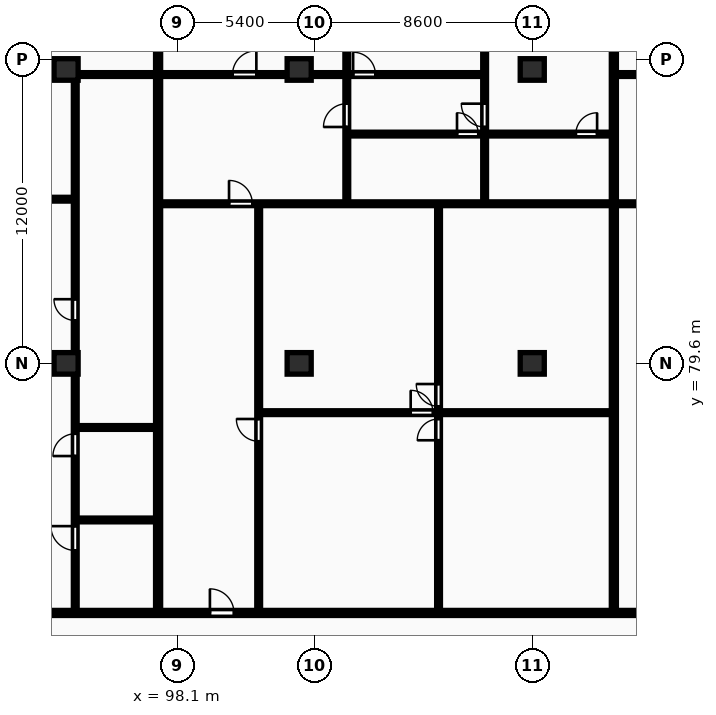
"""IFC4 building model, lengths in metres.
Left out: names, types, materials, properties, quantities, classifications, styles, units other than length and angle.
Written with IfcOpenShell. Run it as: python <this file> out.ifc"""

import sys

from ifc_helpers import new_model, si_unit, direction, frame, frame_2d, origin, origin_2d, place, context, subcontext, project, spatial, rectangle, extrude, element, fill, save


model = new_model("IFC4")
c1 = context("Model", 3, precision=1e-05, world=origin(), true_north=direction((0.0, 1.0)))
c2 = subcontext(c1, "Body", "Model", "MODEL_VIEW")
j1 = project(units=[si_unit("LENGTHUNIT", "METRE"), si_unit("PLANEANGLEUNIT", "RADIAN")], contexts=[c1])
p1 = place(None, origin())
s1 = spatial("IfcSite", under=j1, at=p1, CompositionType="ELEMENT")
p2 = place(p1, origin())
s2 = spatial("IfcBuilding", under=s1, at=p2, CompositionType="ELEMENT")
p3 = place(p2, frame((0.0, 0.0, 119.8)))
s3 = spatial("IfcBuildingStorey", under=s2, at=p3, CompositionType="ELEMENT", Elevation=119.8)
for number, where, z_axis, x_axis in (
    (1, (93.7, 79.6, 0.0), (0.0, 0.0, 1.0), (1.0, 0.0, 0.0)),
    (2, (93.7, 91.2, 0.0), (0.0, 0.0, 1.0), (1.0, 0.0, 0.0)),
    (3, (102.9, 79.6, 0.0), (0.0, 0.0, 1.0), (1.0, 0.0, 0.0)),
    (4, (102.9, 91.2, 0.0), (0.0, 0.0, 1.0), (1.0, 0.0, 0.0)),
    (5, (112.1, 79.6, 0.0), (0.0, 0.0, 1.0), (1.0, 0.0, 0.0)),
    (6, (112.1, 91.2, 0.0), (0.0, 0.0, 1.0), (1.0, 0.0, 0.0)),
):
    element("IfcColumn", number, at=place(p3, frame(where, z_axis=z_axis, x_axis=x_axis)), inside=s3, PredefinedType="COLUMN", context=c2, shape_type="SweptSolid", body=[
        extrude(rectangle(XDim=0.95, YDim=0.85, at=origin_2d()), origin(), (0.0, 0.0, 1.0), 3.25),
    ])
p4 = place(p3, frame((97.332, 69.83, 0.0), z_axis=(0.0, 0.0, 1.0), x_axis=(0.0, 1.0, 0.0)))
e7 = element("IfcWall", 7, at=p4, inside=s3, PredefinedType="PARTITIONING", context=c2, shape_type="SweptSolid", body=[
    extrude(rectangle(XDim=26.07, YDim=0.2, at=frame_2d((13.035, 0.0))), origin(), (0.0, 0.0, 1.0), 2.97),
])
p5 = place(p3, frame((77.591, 86.08, 0.0), z_axis=(0.0, 0.0, 1.0), x_axis=(1.0, 0.0, 0.0)))
e8 = element("IfcWall", 8, at=p5, inside=s3, PredefinedType="PARTITIONING", context=c2, shape_type="SweptSolid", body=[
    extrude(rectangle(XDim=16.431, YDim=0.15, at=frame_2d((8.215, 0.0))), origin(), (0.0, 0.0, 1.0), 2.97),
])
p6 = place(p5, frame((7.746, 0.0, 0.0)))
e9 = element("IfcOpeningElement", 9, at=p6, cuts=e8, PredefinedType="OPENING", context=c2, shape_type="SweptSolid", body=[
    extrude(rectangle(XDim=0.94, YDim=2.1, at=frame_2d((0.47, 1.05))), frame((0.0, 0.085, 0.0), z_axis=(0.0, -1.0, 0.0), x_axis=(1.0, 0.0, 0.0)), (0.0, 0.0, 1.0), 0.17),
])
for number, where, z_axis, x_axis in (
    (10, (94.122, 73.42, 0.0), (0.0, 0.0, 1.0), (1.0, 0.0, 0.0)),
    (11, (94.122, 77.07, 0.0), (0.0, 0.0, 1.0), (1.0, 0.0, 0.0)),
):
    element("IfcWall", number, at=place(p3, frame(where, z_axis=z_axis, x_axis=x_axis)), inside=s3, PredefinedType="PARTITIONING", context=c2, shape_type="SweptSolid", body=[
        extrude(rectangle(XDim=3.13, YDim=0.15, at=frame_2d((1.565, 0.0))), origin(), (0.0, 0.0, 1.0), 2.97),
    ])
p7 = place(p3, frame((94.062, 69.81, 0.0), z_axis=(0.0, 0.0, 1.0), x_axis=(0.0, 1.0, 0.0)))
e12 = element("IfcWall", 12, at=p7, inside=s3, PredefinedType="PARTITIONING", context=c2, shape_type="SweptSolid", body=[
    extrude(rectangle(XDim=21.13, YDim=0.15, at=frame_2d((10.565, 0.0))), origin(), (0.0, 0.0, 1.0), 2.97),
])
p8 = place(p7, frame((2.406, 0.0, 0.0)))
e13 = element("IfcOpeningElement", 13, at=p8, cuts=e12, PredefinedType="OPENING", context=c2, shape_type="SweptSolid", body=[
    extrude(rectangle(XDim=0.96, YDim=2.1, at=frame_2d((0.48, 1.05))), frame((0.0, 0.085, 0.0), z_axis=(0.0, -1.0, 0.0), x_axis=(1.0, 0.0, 0.0)), (0.0, 0.0, 1.0), 0.17),
])
p9 = place(p7, frame((6.133, 0.0, 0.0)))
e14 = element("IfcOpeningElement", 14, at=p9, cuts=e12, PredefinedType="OPENING", context=c2, shape_type="SweptSolid", body=[
    extrude(rectangle(XDim=0.88, YDim=2.06, at=frame_2d((0.44, 1.03))), frame((0.0, 0.085, 0.0), z_axis=(0.0, -1.0, 0.0), x_axis=(1.0, 0.0, 0.0)), (0.0, 0.0, 1.0), 0.17),
])
p10 = place(p7, frame((11.482, 0.0, 0.0)))
e15 = element("IfcOpeningElement", 15, at=p10, cuts=e12, PredefinedType="OPENING", context=c2, shape_type="SweptSolid", body=[
    extrude(rectangle(XDim=0.84, YDim=2.04, at=frame_2d((0.42, 1.02))), frame((0.0, 0.085, 0.0), z_axis=(0.0, -1.0, 0.0), x_axis=(1.0, 0.0, 0.0)), (0.0, 0.0, 1.0), 0.17),
])
p11 = place(p3, frame((77.591, 91.0, 0.0), z_axis=(0.0, 0.0, 1.0), x_axis=(1.0, 0.0, 0.0)))
e16 = element("IfcWall", 16, at=p11, inside=s3, PredefinedType="PARTITIONING", context=c2, shape_type="SweptSolid", body=[
    extrude(rectangle(XDim=19.661, YDim=0.15, at=frame_2d((9.831, 0.0))), origin(), (0.0, 0.0, 1.0), 2.663),
])
p12 = place(p11, frame((4.218, 0.0, 0.0)))
e17 = element("IfcOpeningElement", 17, at=p12, cuts=e16, PredefinedType="OPENING", context=c2, shape_type="SweptSolid", body=[
    extrude(rectangle(XDim=0.94, YDim=2.1, at=frame_2d((0.47, 1.05))), frame((0.0, 0.085, 0.0), z_axis=(0.0, -1.0, 0.0), x_axis=(1.0, 0.0, 0.0)), (0.0, 0.0, 1.0), 0.17),
])
p13 = place(p11, frame((9.361, 0.0, 0.0)))
e18 = element("IfcOpeningElement", 18, at=p13, cuts=e16, PredefinedType="OPENING", context=c2, shape_type="SweptSolid", body=[
    extrude(rectangle(XDim=0.94, YDim=2.1, at=frame_2d((0.47, 1.05))), frame((0.0, 0.085, 0.0), z_axis=(0.0, -1.0, 0.0), x_axis=(1.0, 0.0, 0.0)), (0.0, 0.0, 1.0), 0.17),
])
p14 = place(p3, frame((115.321, 69.83, 0.0), z_axis=(0.0, 0.0, 1.0), x_axis=(0.0, 1.0, 0.0)))
e19 = element("IfcWall", 19, at=p14, inside=s3, PredefinedType="PARTITIONING", context=c2, shape_type="SweptSolid", body=[
    extrude(rectangle(XDim=26.07, YDim=0.2, at=frame_2d((13.035, 0.0))), origin(), (0.0, 0.0, 1.0), 2.97),
])
p15 = place(p3, frame((108.401, 69.81, 0.0), z_axis=(0.0, 0.0, 1.0), x_axis=(0.0, 1.0, 0.0)))
e20 = element("IfcWall", 20, at=p15, inside=s3, PredefinedType="PARTITIONING", context=c2, shape_type="SweptSolid", body=[
    extrude(rectangle(XDim=16.05, YDim=0.15, at=frame_2d((8.025, 0.0))), origin(), (0.0, 0.0, 1.0), 2.97),
])
p16 = place(p15, frame((6.755, 0.0, 0.0)))
e21 = element("IfcOpeningElement", 21, at=p16, cuts=e20, PredefinedType="OPENING", context=c2, shape_type="SweptSolid", body=[
    extrude(rectangle(XDim=0.84, YDim=2.04, at=frame_2d((0.42, 1.02))), frame((0.0, 0.085, 0.0), z_axis=(0.0, -1.0, 0.0), x_axis=(1.0, 0.0, 0.0)), (0.0, 0.0, 1.0), 0.17),
])
p17 = place(p15, frame((8.095, 0.0, 0.0)))
e22 = element("IfcOpeningElement", 22, at=p17, cuts=e20, PredefinedType="OPENING", context=c2, shape_type="SweptSolid", body=[
    extrude(rectangle(XDim=0.88, YDim=2.06, at=frame_2d((0.44, 1.03))), frame((0.0, 0.085, 0.0), z_axis=(0.0, -1.0, 0.0), x_axis=(1.0, 0.0, 0.0)), (0.0, 0.0, 1.0), 0.17),
])
p18 = place(p3, frame((101.362, 77.655, 0.0), z_axis=(0.0, 0.0, 1.0), x_axis=(1.0, 0.0, 0.0)))
e23 = element("IfcWall", 23, at=p18, inside=s3, PredefinedType="PARTITIONING", context=c2, shape_type="SweptSolid", body=[
    extrude(rectangle(XDim=13.88, YDim=0.15, at=frame_2d((6.94, 0.0))), origin(), (0.0, 0.0, 1.0), 2.97),
])
p19 = place(p18, frame((5.94, 0.0, 0.0)))
e24 = element("IfcOpeningElement", 24, at=p19, cuts=e23, PredefinedType="OPENING", context=c2, shape_type="SweptSolid", body=[
    extrude(rectangle(XDim=0.88, YDim=2.06, at=frame_2d((0.44, 1.03))), frame((0.0, 0.085, 0.0), z_axis=(0.0, -1.0, 0.0), x_axis=(1.0, 0.0, 0.0)), (0.0, 0.0, 1.0), 0.17),
])
p20 = place(p3, frame((101.302, 69.81, 0.0), z_axis=(0.0, 0.0, 1.0), x_axis=(0.0, 1.0, 0.0)))
e25 = element("IfcWall", 25, at=p20, inside=s3, PredefinedType="PARTITIONING", context=c2, shape_type="SweptSolid", body=[
    extrude(rectangle(XDim=16.05, YDim=0.15, at=frame_2d((8.025, 0.0))), origin(), (0.0, 0.0, 1.0), 2.97),
])
p21 = place(p20, frame((6.715, 0.0, 0.0)))
e26 = element("IfcOpeningElement", 26, at=p21, cuts=e25, PredefinedType="OPENING", context=c2, shape_type="SweptSolid", body=[
    extrude(rectangle(XDim=0.88, YDim=2.06, at=frame_2d((0.44, 1.03))), frame((0.0, 0.085, 0.0), z_axis=(0.0, -1.0, 0.0), x_axis=(1.0, 0.0, 0.0)), (0.0, 0.0, 1.0), 0.17),
])
p22 = place(p3, frame((104.78, 85.94, 0.0), z_axis=(0.0, 0.0, 1.0), x_axis=(0.0, 1.0, 0.0)))
e27 = element("IfcWall", 27, at=p22, inside=s3, PredefinedType="PARTITIONING", context=c2, shape_type="SweptSolid", body=[
    extrude(rectangle(XDim=9.96, YDim=0.15, at=frame_2d((4.98, 0.0))), origin(), (0.0, 0.0, 1.0), 2.97),
])
p23 = place(p22, frame((2.99, 0.0, 0.0)))
e28 = element("IfcOpeningElement", 28, at=p23, cuts=e27, PredefinedType="OPENING", context=c2, shape_type="SweptSolid", body=[
    extrude(rectangle(XDim=0.92, YDim=2.08, at=frame_2d((0.46, 1.04))), frame((0.0, 0.085, 0.0), z_axis=(0.0, -1.0, 0.0), x_axis=(1.0, 0.0, 0.0)), (0.0, 0.0, 1.0), 0.17),
])
p24 = place(p3, frame((110.22, 85.94, 0.0), z_axis=(0.0, 0.0, 1.0), x_axis=(0.0, 1.0, 0.0)))
e29 = element("IfcWall", 29, at=p24, inside=s3, PredefinedType="PARTITIONING", context=c2, shape_type="SweptSolid", body=[
    extrude(rectangle(XDim=2.69, YDim=0.15, at=frame_2d((1.345, 0.0))), origin(), (0.0, 0.0, 1.0), 2.97),
])
p25 = place(p3, frame((110.22, 88.67, 0.0), z_axis=(0.0, 0.0, 1.0), x_axis=(0.0, 1.0, 0.0)))
e30 = element("IfcWall", 30, at=p25, inside=s3, PredefinedType="PARTITIONING", context=c2, shape_type="SweptSolid", body=[
    extrude(rectangle(XDim=7.23, YDim=0.15, at=frame_2d((3.615, 0.0))), origin(), (0.0, 0.0, 1.0), 2.97),
])
p26 = place(p25, frame((0.26, 0.0, 0.0)))
e31 = element("IfcOpeningElement", 31, at=p26, cuts=e30, PredefinedType="OPENING", context=c2, shape_type="SweptSolid", body=[
    extrude(rectangle(XDim=0.92, YDim=2.08, at=frame_2d((0.46, 1.04))), frame((0.0, 0.085, 0.0), z_axis=(0.0, -1.0, 0.0), x_axis=(1.0, 0.0, 0.0)), (0.0, 0.0, 1.0), 0.17),
])
p27 = place(p3, frame((104.82, 88.65, 0.0), z_axis=(0.0, 0.0, 1.0), x_axis=(1.0, 0.0, 0.0)))
e32 = element("IfcWall", 32, at=p27, inside=s3, PredefinedType="PARTITIONING", context=c2, shape_type="SweptSolid", body=[
    extrude(rectangle(XDim=10.421, YDim=0.15, at=frame_2d((5.21, 0.0))), origin(), (0.0, 0.0, 1.0), 2.97),
])
p28 = place(p27, frame((4.31, 0.0, 0.0)))
e33 = element("IfcOpeningElement", 33, at=p28, cuts=e32, PredefinedType="OPENING", context=c2, shape_type="SweptSolid", body=[
    extrude(rectangle(XDim=0.84, YDim=2.04, at=frame_2d((0.42, 1.02))), frame((0.0, 0.085, 0.0), z_axis=(0.0, -1.0, 0.0), x_axis=(1.0, 0.0, 0.0)), (0.0, 0.0, 1.0), 0.17),
])
p29 = place(p27, frame((9.0, 0.0, 0.0)))
e34 = element("IfcOpeningElement", 34, at=p29, cuts=e32, PredefinedType="OPENING", context=c2, shape_type="SweptSolid", body=[
    extrude(rectangle(XDim=0.84, YDim=2.04, at=frame_2d((0.42, 1.02))), frame((0.0, 0.085, 0.0), z_axis=(0.0, -1.0, 0.0), x_axis=(1.0, 0.0, 0.0)), (0.0, 0.0, 1.0), 0.17),
])
p30 = place(p3, frame((97.412, 85.9, 0.0), z_axis=(0.0, 0.0, 1.0), x_axis=(1.0, 0.0, 0.0)))
e35 = element("IfcWall", 35, at=p30, inside=s3, PredefinedType="PARTITIONING", context=c2, shape_type="SweptSolid", body=[
    extrude(rectangle(XDim=17.83, YDim=0.15, at=frame_2d((8.915, 0.0))), origin(), (0.0, 0.0, 1.0), 2.97),
])
p31 = place(p30, frame((2.72, 0.0, 0.0)))
e36 = element("IfcOpeningElement", 36, at=p31, cuts=e35, PredefinedType="OPENING", context=c2, shape_type="SweptSolid", body=[
    extrude(rectangle(XDim=0.92, YDim=2.08, at=frame_2d((0.46, 1.04))), frame((0.0, 0.085, 0.0), z_axis=(0.0, -1.0, 0.0), x_axis=(1.0, 0.0, 0.0)), (0.0, 0.0, 1.0), 0.17),
])
p32 = place(p3, frame((97.412, 91.0, 0.0), z_axis=(0.0, 0.0, 1.0), x_axis=(1.0, 0.0, 0.0)))
e37 = element("IfcWall", 37, at=p32, inside=s3, PredefinedType="PARTITIONING", context=c2, shape_type="SweptSolid", body=[
    extrude(rectangle(XDim=12.808, YDim=0.15, at=frame_2d((6.404, 0.0))), origin(), (0.0, 0.0, 1.0), 2.663),
])
p33 = place(p32, frame((2.858, 0.0, 0.0)))
e38 = element("IfcOpeningElement", 38, at=p33, cuts=e37, PredefinedType="OPENING", context=c2, shape_type="SweptSolid", body=[
    extrude(rectangle(XDim=0.94, YDim=2.1, at=frame_2d((0.47, 1.05))), frame((0.0, 0.085, 0.0), z_axis=(0.0, -1.0, 0.0), x_axis=(1.0, 0.0, 0.0)), (0.0, 0.0, 1.0), 0.17),
])
p34 = place(p32, frame((7.618, 0.0, 0.0)))
e39 = element("IfcOpeningElement", 39, at=p34, cuts=e37, PredefinedType="OPENING", context=c2, shape_type="SweptSolid", body=[
    extrude(rectangle(XDim=0.88, YDim=2.06, at=frame_2d((0.44, 1.03))), frame((0.0, 0.085, 0.0), z_axis=(0.0, -1.0, 0.0), x_axis=(1.0, 0.0, 0.0)), (0.0, 0.0, 1.0), 0.17),
])
p35 = place(p3, frame((115.401, 85.9, 0.0), z_axis=(0.0, 0.0, 1.0), x_axis=(1.0, 0.0, 0.0)))
e40 = element("IfcWall", 40, at=p35, inside=s3, PredefinedType="PARTITIONING", context=c2, shape_type="SweptSolid", body=[
    extrude(rectangle(XDim=15.119, YDim=0.15, at=frame_2d((7.56, 0.0))), origin(), (0.0, 0.0, 1.0), 2.97),
])
p36 = place(p35, frame((2.72, 0.0, 0.0)))
e41 = element("IfcOpeningElement", 41, at=p36, cuts=e40, PredefinedType="OPENING", context=c2, shape_type="SweptSolid", body=[
    extrude(rectangle(XDim=0.92, YDim=2.08, at=frame_2d((0.46, 1.04))), frame((0.0, 0.085, 0.0), z_axis=(0.0, -1.0, 0.0), x_axis=(1.0, 0.0, 0.0)), (0.0, 0.0, 1.0), 0.17),
])
p37 = place(p3, frame((115.401, 91.0, 0.0), z_axis=(0.0, 0.0, 1.0), x_axis=(1.0, 0.0, 0.0)))
e42 = element("IfcWall", 42, at=p37, inside=s3, PredefinedType="PARTITIONING", context=c2, shape_type="SweptSolid", body=[
    extrude(rectangle(XDim=10.869, YDim=0.15, at=frame_2d((5.435, 0.0))), origin(), (0.0, 0.0, 1.0), 2.663),
])
p38 = place(p37, frame((2.279, 0.0, 0.0)))
e43 = element("IfcOpeningElement", 43, at=p38, cuts=e42, PredefinedType="OPENING", context=c2, shape_type="SweptSolid", body=[
    extrude(rectangle(XDim=0.94, YDim=2.1, at=frame_2d((0.47, 1.05))), frame((0.0, 0.085, 0.0), z_axis=(0.0, -1.0, 0.0), x_axis=(1.0, 0.0, 0.0)), (0.0, 0.0, 1.0), 0.17),
])
p39 = place(p37, frame((7.029, 0.0, 0.0)))
e44 = element("IfcOpeningElement", 44, at=p39, cuts=e42, PredefinedType="OPENING", context=c2, shape_type="SweptSolid", body=[
    extrude(rectangle(XDim=0.88, YDim=2.06, at=frame_2d((0.44, 1.03))), frame((0.0, 0.085, 0.0), z_axis=(0.0, -1.0, 0.0), x_axis=(1.0, 0.0, 0.0)), (0.0, 0.0, 1.0), 0.17),
])
p40 = place(p3, frame((57.6, 69.75, 0.0), z_axis=(0.0, 0.0, 1.0), x_axis=(1.0, 0.0, 0.0)))
e45 = element("IfcWall", 45, at=p40, inside=s3, PredefinedType="PARTITIONING", context=c2, shape_type="SweptSolid", body=[
    extrude(rectangle(XDim=73.0, YDim=0.2, at=frame_2d((36.5, 0.0))), origin(), (0.0, 0.0, 1.0), 2.97),
])
p41 = place(p40, frame((7.364, 0.0, 0.0)))
e46 = element("IfcOpeningElement", 46, at=p41, cuts=e45, PredefinedType="OPENING", context=c2, shape_type="SweptSolid", body=[
    extrude(rectangle(XDim=1.22, YDim=2.18, at=frame_2d((0.61, 1.09))), frame((0.0, 0.11, 0.0), z_axis=(0.0, -1.0, 0.0), x_axis=(1.0, 0.0, 0.0)), (0.0, 0.0, 1.0), 0.22),
])
p42 = place(p40, frame((28.813, 0.0, 0.0)))
e47 = element("IfcOpeningElement", 47, at=p42, cuts=e45, PredefinedType="OPENING", context=c2, shape_type="SweptSolid", body=[
    extrude(rectangle(XDim=1.22, YDim=2.18, at=frame_2d((0.61, 1.09))), frame((0.0, 0.11, 0.0), z_axis=(0.0, -1.0, 0.0), x_axis=(1.0, 0.0, 0.0)), (0.0, 0.0, 1.0), 0.22),
])
p43 = place(p40, frame((41.777, 0.0, 0.0)))
e48 = element("IfcOpeningElement", 48, at=p43, cuts=e45, PredefinedType="OPENING", context=c2, shape_type="SweptSolid", body=[
    extrude(rectangle(XDim=0.95, YDim=2.15, at=frame_2d((0.475, 1.075))), frame((0.0, 0.11, 0.0), z_axis=(0.0, -1.0, 0.0), x_axis=(1.0, 0.0, 0.0)), (0.0, 0.0, 1.0), 0.22),
])
p44 = place(p40, frame((59.766, 0.0, 0.0)))
e49 = element("IfcOpeningElement", 49, at=p44, cuts=e45, PredefinedType="OPENING", context=c2, shape_type="SweptSolid", body=[
    extrude(rectangle(XDim=0.95, YDim=2.15, at=frame_2d((0.475, 1.075))), frame((0.0, 0.11, 0.0), z_axis=(0.0, -1.0, 0.0), x_axis=(1.0, 0.0, 0.0)), (0.0, 0.0, 1.0), 0.22),
])
p45 = place(p8, origin())
e50 = element("IfcDoor", 50, at=p45, inside=s3, OperationType="SINGLE_SWING_RIGHT", PredefinedType="DOOR", context=c2, shape_type="SweptSolid", body=[
    extrude(rectangle(XDim=0.96, YDim=2.1, at=frame_2d((0.48, 1.05))), frame((0.0, 0.025, 0.0), z_axis=(0.0, -1.0, 0.0), x_axis=(1.0, 0.0, 0.0)), (0.0, 0.0, 1.0), 0.05),
])
fill(e13, e50)
p46 = place(p9, origin())
e51 = element("IfcDoor", 51, at=p46, inside=s3, OperationType="SINGLE_SWING_LEFT", PredefinedType="DOOR", context=c2, shape_type="SweptSolid", body=[
    extrude(rectangle(XDim=0.88, YDim=2.06, at=frame_2d((0.44, 1.03))), frame((0.0, 0.025, 0.0), z_axis=(0.0, -1.0, 0.0), x_axis=(1.0, 0.0, 0.0)), (0.0, 0.0, 1.0), 0.05),
])
fill(e14, e51)
p47 = place(p10, origin())
e52 = element("IfcDoor", 52, at=p47, inside=s3, OperationType="SINGLE_SWING_RIGHT", PredefinedType="DOOR", context=c2, shape_type="SweptSolid", body=[
    extrude(rectangle(XDim=0.84, YDim=2.04, at=frame_2d((0.42, 1.02))), frame((0.0, 0.025, 0.0), z_axis=(0.0, -1.0, 0.0), x_axis=(1.0, 0.0, 0.0)), (0.0, 0.0, 1.0), 0.05),
])
fill(e15, e52)
p48 = place(p16, origin())
e53 = element("IfcDoor", 53, at=p48, inside=s3, OperationType="SINGLE_SWING_LEFT", PredefinedType="DOOR", context=c2, shape_type="SweptSolid", body=[
    extrude(rectangle(XDim=0.84, YDim=2.04, at=frame_2d((0.42, 1.02))), frame((0.0, 0.025, 0.0), z_axis=(0.0, -1.0, 0.0), x_axis=(1.0, 0.0, 0.0)), (0.0, 0.0, 1.0), 0.05),
])
fill(e21, e53)
p49 = place(p17, origin())
e54 = element("IfcDoor", 54, at=p49, inside=s3, OperationType="SINGLE_SWING_RIGHT", PredefinedType="DOOR", context=c2, shape_type="SweptSolid", body=[
    extrude(rectangle(XDim=0.88, YDim=2.06, at=frame_2d((0.44, 1.03))), frame((0.0, 0.025, 0.0), z_axis=(0.0, -1.0, 0.0), x_axis=(1.0, 0.0, 0.0)), (0.0, 0.0, 1.0), 0.05),
])
fill(e22, e54)
p50 = place(p19, origin())
e55 = element("IfcDoor", 55, at=p50, inside=s3, OperationType="SINGLE_SWING_LEFT", PredefinedType="DOOR", context=c2, shape_type="SweptSolid", body=[
    extrude(rectangle(XDim=0.88, YDim=2.06, at=frame_2d((0.44, 1.03))), frame((0.0, 0.025, 0.0), z_axis=(0.0, -1.0, 0.0), x_axis=(1.0, 0.0, 0.0)), (0.0, 0.0, 1.0), 0.05),
])
fill(e24, e55)
p51 = place(p21, origin())
e56 = element("IfcDoor", 56, at=p51, inside=s3, OperationType="SINGLE_SWING_RIGHT", PredefinedType="DOOR", context=c2, shape_type="SweptSolid", body=[
    extrude(rectangle(XDim=0.88, YDim=2.06, at=frame_2d((0.44, 1.03))), frame((0.0, 0.025, 0.0), z_axis=(0.0, -1.0, 0.0), x_axis=(1.0, 0.0, 0.0)), (0.0, 0.0, 1.0), 0.05),
])
fill(e26, e56)
p52 = place(p23, origin())
e57 = element("IfcDoor", 57, at=p52, inside=s3, OperationType="SINGLE_SWING_LEFT", PredefinedType="DOOR", context=c2, shape_type="SweptSolid", body=[
    extrude(rectangle(XDim=0.92, YDim=2.08, at=frame_2d((0.46, 1.04))), frame((0.0, 0.025, 0.0), z_axis=(0.0, -1.0, 0.0), x_axis=(1.0, 0.0, 0.0)), (0.0, 0.0, 1.0), 0.05),
])
fill(e28, e57)
p53 = place(p26, origin())
e58 = element("IfcDoor", 58, at=p53, inside=s3, OperationType="SINGLE_SWING_RIGHT", PredefinedType="DOOR", context=c2, shape_type="SweptSolid", body=[
    extrude(rectangle(XDim=0.92, YDim=2.08, at=frame_2d((0.46, 1.04))), frame((0.0, 0.025, 0.0), z_axis=(0.0, -1.0, 0.0), x_axis=(1.0, 0.0, 0.0)), (0.0, 0.0, 1.0), 0.05),
])
fill(e31, e58)
p54 = place(p28, origin())
e59 = element("IfcDoor", 59, at=p54, inside=s3, OperationType="SINGLE_SWING_LEFT", PredefinedType="DOOR", context=c2, shape_type="SweptSolid", body=[
    extrude(rectangle(XDim=0.84, YDim=2.04, at=frame_2d((0.42, 1.02))), frame((0.0, 0.025, 0.0), z_axis=(0.0, -1.0, 0.0), x_axis=(1.0, 0.0, 0.0)), (0.0, 0.0, 1.0), 0.05),
])
fill(e33, e59)
p55 = place(p29, origin())
e60 = element("IfcDoor", 60, at=p55, inside=s3, OperationType="SINGLE_SWING_RIGHT", PredefinedType="DOOR", context=c2, shape_type="SweptSolid", body=[
    extrude(rectangle(XDim=0.84, YDim=2.04, at=frame_2d((0.42, 1.02))), frame((0.0, 0.025, 0.0), z_axis=(0.0, -1.0, 0.0), x_axis=(1.0, 0.0, 0.0)), (0.0, 0.0, 1.0), 0.05),
])
fill(e34, e60)
p56 = place(p31, origin())
e61 = element("IfcDoor", 61, at=p56, inside=s3, OperationType="SINGLE_SWING_LEFT", PredefinedType="DOOR", context=c2, shape_type="SweptSolid", body=[
    extrude(rectangle(XDim=0.92, YDim=2.08, at=frame_2d((0.46, 1.04))), frame((0.0, 0.025, 0.0), z_axis=(0.0, -1.0, 0.0), x_axis=(1.0, 0.0, 0.0)), (0.0, 0.0, 1.0), 0.05),
])
fill(e36, e61)
p57 = place(p33, origin())
e62 = element("IfcDoor", 62, at=p57, inside=s3, OperationType="SINGLE_SWING_RIGHT", PredefinedType="DOOR", context=c2, shape_type="SweptSolid", body=[
    extrude(rectangle(XDim=0.94, YDim=2.1, at=frame_2d((0.47, 1.05))), frame((0.0, 0.025, 0.0), z_axis=(0.0, -1.0, 0.0), x_axis=(1.0, 0.0, 0.0)), (0.0, 0.0, 1.0), 0.05),
])
fill(e38, e62)
p58 = place(p34, origin())
e63 = element("IfcDoor", 63, at=p58, inside=s3, OperationType="SINGLE_SWING_LEFT", PredefinedType="DOOR", context=c2, shape_type="SweptSolid", body=[
    extrude(rectangle(XDim=0.88, YDim=2.06, at=frame_2d((0.44, 1.03))), frame((0.0, 0.025, 0.0), z_axis=(0.0, -1.0, 0.0), x_axis=(1.0, 0.0, 0.0)), (0.0, 0.0, 1.0), 0.05),
])
fill(e39, e63)
p59 = place(p43, origin())
e64 = element("IfcDoor", 64, at=p59, inside=s3, OperationType="SINGLE_SWING_LEFT", PredefinedType="DOOR", context=c2, shape_type="SweptSolid", body=[
    extrude(rectangle(XDim=0.95, YDim=2.15, at=frame_2d((0.475, 1.075))), frame((0.0, 0.025, 0.0), z_axis=(0.0, -1.0, 0.0), x_axis=(1.0, 0.0, 0.0)), (0.0, 0.0, 1.0), 0.05),
])
fill(e48, e64)
save(model, sys.argv[1])
